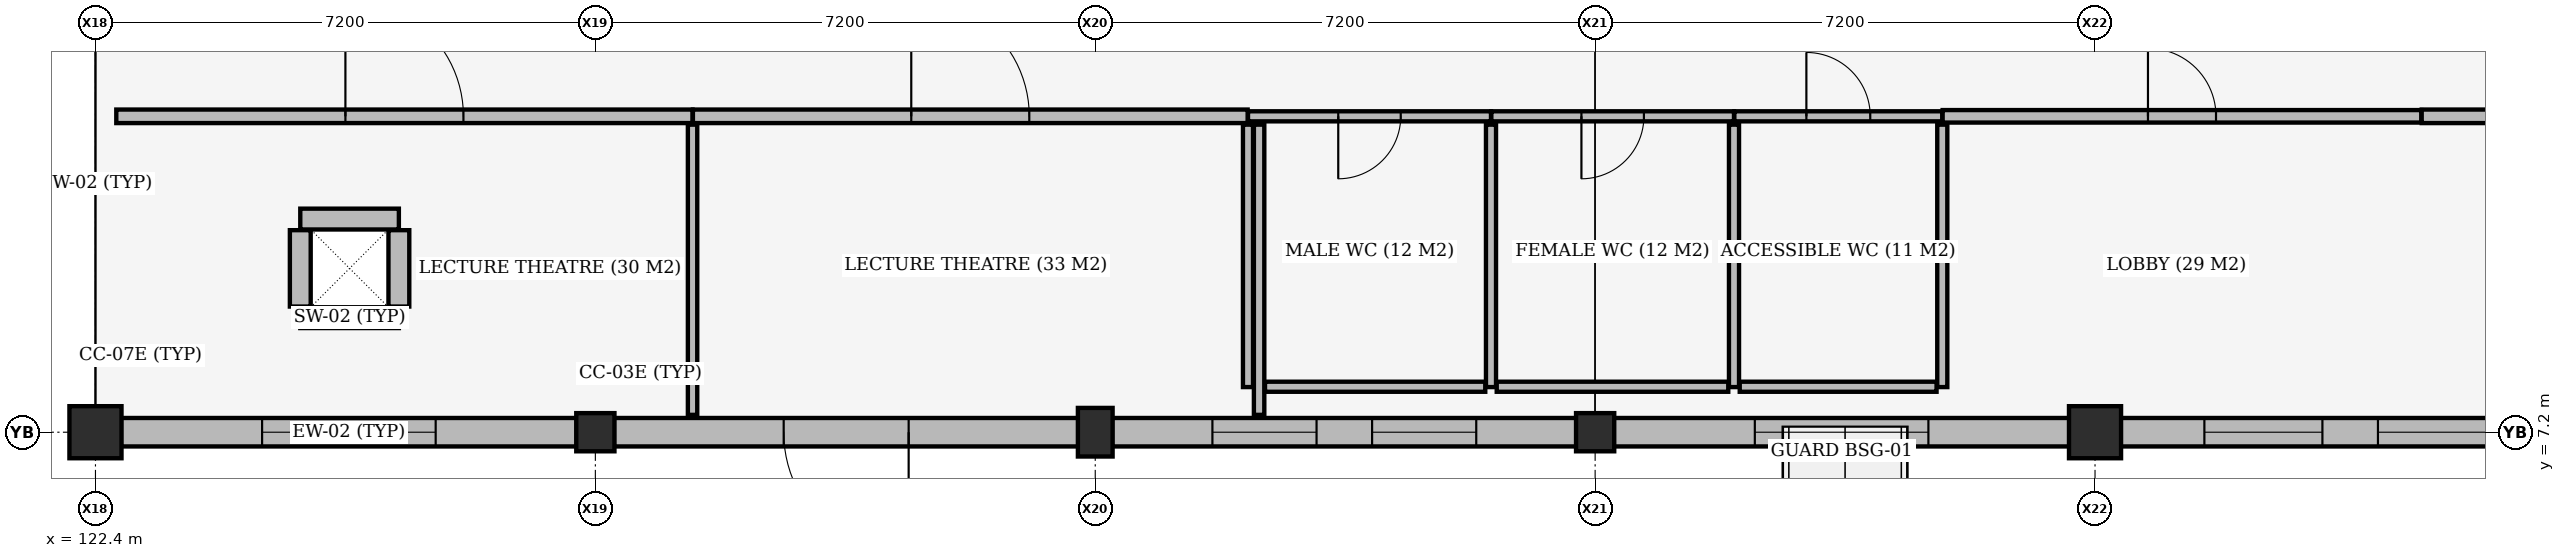
"""IFC4 building model, lengths in metres.
Left out: names, types, materials, properties, quantities, classifications, styles, units other than length and angle.
Written with IfcOpenShell. Run it as: python <this file> out.ifc"""

import sys

from ifc_helpers import new_model, si_unit, direction, frame, frame_2d, origin, origin_2d, place, context, subcontext, project, spatial, rectangle, extrude, element, fill, save


model = new_model("IFC4")
c1 = context("Model", 3, precision=1e-05, world=origin(), true_north=direction((0.0, 1.0)))
c2 = subcontext(c1, "Body", "Model", "MODEL_VIEW")
j1 = project(units=[si_unit("LENGTHUNIT", "METRE"), si_unit("PLANEANGLEUNIT", "RADIAN")], contexts=[c1])
p1 = place(None, origin())
s1 = spatial("IfcSite", under=j1, at=p1, CompositionType="ELEMENT")
p2 = place(p1, origin())
s2 = spatial("IfcBuilding", under=s1, at=p2, CompositionType="ELEMENT")
p3 = place(p2, origin())
s3 = spatial("IfcBuildingStorey", under=s2, at=p3, CompositionType="ELEMENT", Elevation=0.0)
p4 = place(p3, frame((125.35, 8.85, 0.0), z_axis=(0.0, 0.0, 1.0), x_axis=(1.0, 0.0, 0.0)))
e1 = element("IfcWall", 1, at=p4, inside=s3, PredefinedType="SHEAR", context=c2, shape_type="SweptSolid", body=[
    extrude(rectangle(XDim=1.42, YDim=0.3, at=frame_2d((0.71, 0.0))), origin(), (0.0, 0.0, 1.0), 5.16),
])
p5 = place(p3, frame((126.77, 9.01, 0.0), z_axis=(0.0, 0.0, 1.0), x_axis=(0.0, 1.0, 0.0)))
e2 = element("IfcWall", 2, at=p5, inside=s3, PredefinedType="SHEAR", context=c2, shape_type="SweptSolid", body=[
    extrude(rectangle(XDim=1.1, YDim=0.3, at=frame_2d((0.55, 0.0))), origin(), (0.0, 0.0, 1.0), 5.16),
])
p6 = place(p3, frame((126.77, 10.27, 0.0), z_axis=(0.0, 0.0, 1.0), x_axis=(-1.0, 0.0, 0.0)))
e3 = element("IfcWall", 3, at=p6, inside=s3, PredefinedType="SHEAR", context=c2, shape_type="SweptSolid", body=[
    extrude(rectangle(XDim=1.42, YDim=0.3, at=frame_2d((0.71, 0.0))), origin(), (0.0, 0.0, 1.0), 5.16),
])
p7 = place(p3, frame((125.35, 10.11, 0.0), z_axis=(0.0, 0.0, 1.0), x_axis=(0.0, -1.0, 0.0)))
e4 = element("IfcWall", 4, at=p7, inside=s3, PredefinedType="SHEAR", context=c2, shape_type="SweptSolid", body=[
    extrude(rectangle(XDim=1.1, YDim=0.3, at=frame_2d((0.55, 0.0))), origin(), (0.0, 0.0, 1.0), 5.16),
])
p8 = place(p3, frame((122.4, 7.2, 0.0), z_axis=(0.0, 0.0, 1.0), x_axis=(1.0, 0.0, 0.0)))
e5 = element("IfcColumn", 5, at=p8, inside=s3, PredefinedType="COLUMN", context=c2, shape_type="SweptSolid", body=[
    extrude(rectangle(XDim=0.75, YDim=0.75, at=origin_2d()), origin(), (0.0, 0.0, 1.0), 5.1),
])
p9 = place(p3, frame((129.6, 7.2, 0.0), z_axis=(0.0, 0.0, 1.0), x_axis=(1.0, 0.0, 0.0)))
e6 = element("IfcColumn", 6, at=p9, inside=s3, PredefinedType="COLUMN", context=c2, shape_type="SweptSolid", body=[
    extrude(rectangle(XDim=0.55, YDim=0.55, at=origin_2d()), origin(), (0.0, 0.0, 1.0), 5.1),
])
p10 = place(p3, frame((136.8, 7.2, 0.0), z_axis=(0.0, 0.0, 1.0), x_axis=(1.0, 0.0, 0.0)))
e7 = element("IfcColumn", 7, at=p10, inside=s3, PredefinedType="COLUMN", context=c2, shape_type="SweptSolid", body=[
    extrude(rectangle(XDim=0.5, YDim=0.7, at=origin_2d()), origin(), (0.0, 0.0, 1.0), 5.1),
])
p11 = place(p3, frame((144.0, 7.2, 0.0), z_axis=(0.0, 0.0, 1.0), x_axis=(1.0, 0.0, 0.0)))
e8 = element("IfcColumn", 8, at=p11, inside=s3, PredefinedType="COLUMN", context=c2, shape_type="SweptSolid", body=[
    extrude(rectangle(XDim=0.55, YDim=0.55, at=origin_2d()), origin(), (0.0, 0.0, 1.0), 5.1),
])
p12 = place(p3, frame((151.2, 7.2, 0.0), z_axis=(0.0, 0.0, 1.0), x_axis=(1.0, 0.0, 0.0)))
e9 = element("IfcColumn", 9, at=p12, inside=s3, PredefinedType="COLUMN", context=c2, shape_type="SweptSolid", body=[
    extrude(rectangle(XDim=0.75, YDim=0.75, at=origin_2d()), origin(), (0.0, 0.0, 1.0), 5.1),
])
p13 = place(p3, frame((129.333, 7.2, 0.0), z_axis=(0.0, 0.0, 1.0), x_axis=(-1.0, 0.0, 0.0)))
e10 = element("IfcWall", 10, at=p13, inside=s3, PredefinedType="STANDARD", context=c2, shape_type="SweptSolid", body=[
    extrude(rectangle(XDim=6.566, YDim=0.41, at=frame_2d((3.283, 0.0))), origin(), (0.0, 0.0, 1.0), 4.45),
])
p14 = place(p13, frame((2.033, 0.0, 0.85)))
e11 = element("IfcOpeningElement", 11, at=p14, cuts=e10, PredefinedType="OPENING", context=c2, shape_type="SweptSolid", body=[
    extrude(rectangle(XDim=2.5, YDim=2.8, at=frame_2d((1.25, 1.4))), frame((0.0, 0.215, 0.0), z_axis=(0.0, -1.0, 0.0), x_axis=(1.0, 0.0, 0.0)), (0.0, 0.0, 1.0), 0.43),
])
p15 = place(p3, frame((136.558, 7.2, 0.0), z_axis=(0.0, 0.0, 1.0), x_axis=(-1.0, 0.0, 0.0)))
e12 = element("IfcWall", 12, at=p15, inside=s3, PredefinedType="STANDARD", context=c2, shape_type="SweptSolid", body=[
    extrude(rectangle(XDim=6.691, YDim=0.41, at=frame_2d((3.346, 0.0))), origin(), (0.0, 0.0, 1.0), 4.4),
])
p16 = place(p15, frame((2.446, 0.0, 0.0)))
e13 = element("IfcOpeningElement", 13, at=p16, cuts=e12, PredefinedType="OPENING", context=c2, shape_type="SweptSolid", body=[
    extrude(rectangle(XDim=1.8, YDim=2.2, at=frame_2d((0.9, 1.1))), frame((0.0, 0.215, 0.0), z_axis=(0.0, -1.0, 0.0), x_axis=(1.0, 0.0, 0.0)), (0.0, 0.0, 1.0), 0.43),
])
p17 = place(p3, frame((143.733, 7.2, 0.0), z_axis=(0.0, 0.0, 1.0), x_axis=(-1.0, 0.0, 0.0)))
e14 = element("IfcWall", 14, at=p17, inside=s3, PredefinedType="STANDARD", context=c2, shape_type="SweptSolid", body=[
    extrude(rectangle(XDim=6.691, YDim=0.41, at=frame_2d((3.345, 0.0))), origin(), (0.0, 0.0, 1.0), 4.35),
])
p18 = place(p17, frame((1.446, 0.0, 0.95)))
e15 = element("IfcOpeningElement", 15, at=p18, cuts=e14, PredefinedType="OPENING", context=c2, shape_type="SweptSolid", body=[
    extrude(rectangle(XDim=1.5, YDim=2.1, at=frame_2d((0.75, 1.05))), frame((0.0, 0.215, 0.0), z_axis=(0.0, -1.0, 0.0), x_axis=(1.0, 0.0, 0.0)), (0.0, 0.0, 1.0), 0.43),
])
p19 = place(p17, frame((3.746, 0.0, 0.95)))
e16 = element("IfcOpeningElement", 16, at=p19, cuts=e14, PredefinedType="OPENING", context=c2, shape_type="SweptSolid", body=[
    extrude(rectangle(XDim=1.5, YDim=2.1, at=frame_2d((0.75, 1.05))), frame((0.0, 0.215, 0.0), z_axis=(0.0, -1.0, 0.0), x_axis=(1.0, 0.0, 0.0)), (0.0, 0.0, 1.0), 0.43),
])
p20 = place(p3, frame((150.833, 7.2, 0.0), z_axis=(0.0, 0.0, 1.0), x_axis=(-1.0, 0.0, 0.0)))
e17 = element("IfcWall", 17, at=p20, inside=s3, PredefinedType="STANDARD", context=c2, shape_type="SweptSolid", body=[
    extrude(rectangle(XDim=6.566, YDim=0.41, at=frame_2d((3.283, 0.0))), origin(), (0.0, 0.0, 1.0), 4.3),
])
p21 = place(p20, frame((2.033, 0.0, 0.85)))
e18 = element("IfcOpeningElement", 18, at=p21, cuts=e17, PredefinedType="OPENING", context=c2, shape_type="SweptSolid", body=[
    extrude(rectangle(XDim=2.5, YDim=2.8, at=frame_2d((1.25, 1.4))), frame((0.0, 0.215, 0.0), z_axis=(0.0, -1.0, 0.0), x_axis=(1.0, 0.0, 0.0)), (0.0, 0.0, 1.0), 0.43),
])
p22 = place(p3, frame((158.183, 7.2, 0.0), z_axis=(0.0, 0.0, 1.0), x_axis=(-1.0, 0.0, 0.0)))
e19 = element("IfcWall", 19, at=p22, inside=s3, PredefinedType="STANDARD", context=c2, shape_type="SweptSolid", body=[
    extrude(rectangle(XDim=6.616, YDim=0.41, at=frame_2d((3.308, 0.0))), origin(), (0.0, 0.0, 1.0), 4.4),
])
p23 = place(p22, frame((1.208, 0.0, 0.95)))
e20 = element("IfcOpeningElement", 20, at=p23, cuts=e19, PredefinedType="OPENING", context=c2, shape_type="SweptSolid", body=[
    extrude(rectangle(XDim=1.7, YDim=2.1, at=frame_2d((0.85, 1.05))), frame((0.0, 0.215, 0.0), z_axis=(0.0, -1.0, 0.0), x_axis=(1.0, 0.0, 0.0)), (0.0, 0.0, 1.0), 0.43),
])
p24 = place(p22, frame((3.708, 0.0, 0.95)))
e21 = element("IfcOpeningElement", 21, at=p24, cuts=e19, PredefinedType="OPENING", context=c2, shape_type="SweptSolid", body=[
    extrude(rectangle(XDim=1.7, YDim=2.1, at=frame_2d((0.85, 1.05))), frame((0.0, 0.215, 0.0), z_axis=(0.0, -1.0, 0.0), x_axis=(1.0, 0.0, 0.0)), (0.0, 0.0, 1.0), 0.43),
])
p25 = place(p3, frame((139.0, 11.75, 0.0), z_axis=(0.0, 0.0, 1.0), x_axis=(1.0, 0.0, 0.0)))
e22 = element("IfcWall", 22, at=p25, inside=s3, PredefinedType="PLUMBINGWALL", context=c2, shape_type="SweptSolid", body=[
    extrude(rectangle(XDim=3.5, YDim=0.145, at=frame_2d((1.75, 0.0))), origin(), (0.0, 0.0, 1.0), 4.7),
])
p26 = place(p25, frame((1.3, 0.0, 0.0)))
e23 = element("IfcOpeningElement", 23, at=p26, cuts=e22, PredefinedType="OPENING", context=c2, shape_type="SweptSolid", body=[
    extrude(rectangle(XDim=0.9, YDim=2.1, at=frame_2d((0.45, 1.05))), frame((0.0, 0.083, 0.0), z_axis=(0.0, -1.0, 0.0), x_axis=(1.0, 0.0, 0.0)), (0.0, 0.0, 1.0), 0.165),
])
for number, where, z_axis, x_axis in (
    (24, (139.0, 7.85, 0.0), (0.0, 0.0, 1.0), (0.0, 1.0, 0.0)),
    (25, (142.5, 7.85, 0.0), (0.0, 0.0, 1.0), (0.0, 1.0, 0.0)),
):
    element("IfcWall", number, at=place(p3, frame(where, z_axis=z_axis, x_axis=x_axis)), inside=s3, PredefinedType="PLUMBINGWALL", context=c2, shape_type="SweptSolid", body=[
        extrude(rectangle(XDim=3.78, YDim=0.145, at=frame_2d((1.89, 0.0))), origin(), (0.0, 0.0, 1.0), 5.1),
    ])
p27 = place(p3, frame((142.505, 11.75, 0.0), z_axis=(0.0, 0.0, 1.0), x_axis=(1.0, 0.0, 0.0)))
e26 = element("IfcWall", 26, at=p27, inside=s3, PredefinedType="PLUMBINGWALL", context=c2, shape_type="SweptSolid", body=[
    extrude(rectangle(XDim=3.495, YDim=0.145, at=frame_2d((1.748, 0.0))), origin(), (0.0, 0.0, 1.0), 4.35),
])
p28 = place(p27, frame((1.298, 0.0, 0.0)))
e27 = element("IfcOpeningElement", 27, at=p28, cuts=e26, PredefinedType="OPENING", context=c2, shape_type="SweptSolid", body=[
    extrude(rectangle(XDim=0.9, YDim=2.1, at=frame_2d((0.45, 1.05))), frame((0.0, 0.083, 0.0), z_axis=(0.0, -1.0, 0.0), x_axis=(1.0, 0.0, 0.0)), (0.0, 0.0, 1.0), 0.165),
])
p29 = place(p3, frame((146.0, 7.85, 0.0), z_axis=(0.0, 0.0, 1.0), x_axis=(0.0, 1.0, 0.0)))
e28 = element("IfcWall", 28, at=p29, inside=s3, PredefinedType="PLUMBINGWALL", context=c2, shape_type="SweptSolid", body=[
    extrude(rectangle(XDim=3.78, YDim=0.145, at=frame_2d((1.89, 0.0))), origin(), (0.0, 0.0, 1.0), 5.1),
])
p30 = place(p3, frame((146.005, 11.75, 0.0), z_axis=(0.0, 0.0, 1.0), x_axis=(1.0, 0.0, 0.0)))
e29 = element("IfcWall", 29, at=p30, inside=s3, PredefinedType="PLUMBINGWALL", context=c2, shape_type="SweptSolid", body=[
    extrude(rectangle(XDim=2.995, YDim=0.145, at=frame_2d((1.498, 0.0))), origin(), (0.0, 0.0, 1.0), 4.83),
])
p31 = place(p30, frame((1.038, 0.0, 0.0)))
e30 = element("IfcOpeningElement", 30, at=p31, cuts=e29, PredefinedType="OPENING", context=c2, shape_type="SweptSolid", body=[
    extrude(rectangle(XDim=0.92, YDim=2.1, at=frame_2d((0.46, 1.05))), frame((0.0, 0.083, 0.0), z_axis=(0.0, -1.0, 0.0), x_axis=(1.0, 0.0, 0.0)), (0.0, 0.0, 1.0), 0.165),
])
p32 = place(p3, frame((149.0, 7.85, 0.0), z_axis=(0.0, 0.0, 1.0), x_axis=(0.0, 1.0, 0.0)))
e31 = element("IfcWall", 31, at=p32, inside=s3, PredefinedType="PLUMBINGWALL", context=c2, shape_type="SweptSolid", body=[
    extrude(rectangle(XDim=3.78, YDim=0.145, at=frame_2d((1.89, 0.0))), origin(), (0.0, 0.0, 1.0), 5.1),
])
p33 = place(p3, frame((122.7, 11.75, 0.0), z_axis=(0.0, 0.0, 1.0), x_axis=(1.0, 0.0, 0.0)))
e32 = element("IfcWall", 32, at=p33, inside=s3, PredefinedType="PARTITIONING", context=c2, shape_type="SweptSolid", body=[
    extrude(rectangle(XDim=8.3, YDim=0.195, at=frame_2d((4.15, 0.0))), origin(), (0.0, 0.0, 1.0), 4.4),
])
p34 = place(p33, frame((3.3, 0.0, 0.0)))
e33 = element("IfcOpeningElement", 33, at=p34, cuts=e32, PredefinedType="OPENING", context=c2, shape_type="SweptSolid", body=[
    extrude(rectangle(XDim=1.7, YDim=2.25, at=frame_2d((0.85, 1.125))), frame((0.0, 0.107, 0.0), z_axis=(0.0, -1.0, 0.0), x_axis=(1.0, 0.0, 0.0)), (0.0, 0.0, 1.0), 0.215),
])
p35 = place(p3, frame((131.0, 7.45, 0.0), z_axis=(0.0, 0.0, 1.0), x_axis=(0.0, 1.0, 0.0)))
e34 = element("IfcWall", 34, at=p35, inside=s3, PredefinedType="PARTITIONING", context=c2, shape_type="SweptSolid", body=[
    extrude(rectangle(XDim=4.18, YDim=0.135, at=frame_2d((2.09, 0.0))), origin(), (0.0, 0.0, 1.0), 5.1),
])
p36 = place(p3, frame((131.005, 11.75, 0.0), z_axis=(0.0, 0.0, 1.0), x_axis=(1.0, 0.0, 0.0)))
e35 = element("IfcWall", 35, at=p36, inside=s3, PredefinedType="PARTITIONING", context=c2, shape_type="SweptSolid", body=[
    extrude(rectangle(XDim=7.99, YDim=0.195, at=frame_2d((3.995, 0.0))), origin(), (0.0, 0.0, 1.0), 4.45),
])
p37 = place(p36, frame((3.145, 0.0, 0.0)))
e36 = element("IfcOpeningElement", 36, at=p37, cuts=e35, PredefinedType="OPENING", context=c2, shape_type="SweptSolid", body=[
    extrude(rectangle(XDim=1.7, YDim=2.25, at=frame_2d((0.85, 1.125))), frame((0.0, 0.107, 0.0), z_axis=(0.0, -1.0, 0.0), x_axis=(1.0, 0.0, 0.0)), (0.0, 0.0, 1.0), 0.215),
])
p38 = place(p3, frame((139.16, 7.45, 0.0), z_axis=(0.0, 0.0, 1.0), x_axis=(0.0, 1.0, 0.0)))
e37 = element("IfcWall", 37, at=p38, inside=s3, PredefinedType="PARTITIONING", context=c2, shape_type="SweptSolid", body=[
    extrude(rectangle(XDim=4.18, YDim=0.15, at=frame_2d((2.09, 0.0))), origin(), (0.0, 0.0, 1.0), 4.74),
])
p39 = place(p3, frame((149.005, 11.75, 0.0), z_axis=(0.0, 0.0, 1.0), x_axis=(1.0, 0.0, 0.0)))
e38 = element("IfcWall", 38, at=p39, inside=s3, PredefinedType="PARTITIONING", context=c2, shape_type="SweptSolid", body=[
    extrude(rectangle(XDim=6.895, YDim=0.18, at=frame_2d((3.448, 0.0))), origin(), (0.0, 0.0, 1.0), 4.5),
])
p40 = place(p39, frame((2.958, 0.0, 0.0)))
e39 = element("IfcOpeningElement", 39, at=p40, cuts=e38, PredefinedType="OPENING", context=c2, shape_type="SweptSolid", body=[
    extrude(rectangle(XDim=0.98, YDim=2.18, at=frame_2d((0.49, 1.09))), frame((0.0, 0.1, 0.0), z_axis=(0.0, -1.0, 0.0), x_axis=(1.0, 0.0, 0.0)), (0.0, 0.0, 1.0), 0.2),
])
p41 = place(p3, frame((155.905, 11.75, 0.0), z_axis=(0.0, 0.0, 1.0), x_axis=(1.0, 0.0, 0.0)))
e40 = element("IfcWall", 40, at=p41, inside=s3, PredefinedType="PARTITIONING", context=c2, shape_type="SweptSolid", body=[
    extrude(rectangle(XDim=9.792, YDim=0.195, at=frame_2d((4.896, 0.0))), origin(), (0.0, 0.0, 1.0), 4.35),
])
p42 = place(p41, frame((4.046, 0.0, 0.0)))
e41 = element("IfcOpeningElement", 41, at=p42, cuts=e40, PredefinedType="OPENING", context=c2, shape_type="SweptSolid", body=[
    extrude(rectangle(XDim=1.7, YDim=2.25, at=frame_2d((0.85, 1.125))), frame((0.0, 0.107, 0.0), z_axis=(0.0, -1.0, 0.0), x_axis=(1.0, 0.0, 0.0)), (0.0, 0.0, 1.0), 0.215),
])
p43 = place(p3, frame((139.245, 7.855, 0.0), z_axis=(0.0, 0.0, 1.0), x_axis=(1.0, 0.0, 0.0)))
e42 = element("IfcWall", 42, at=p43, inside=s3, PredefinedType="PLUMBINGWALL", context=c2, shape_type="SweptSolid", body=[
    extrude(rectangle(XDim=3.172, YDim=0.145, at=frame_2d((1.586, 0.0))), origin(), (0.0, 0.0, 1.0), 4.7),
])
p44 = place(p3, frame((142.583, 7.855, 0.0), z_axis=(0.0, 0.0, 1.0), x_axis=(1.0, 0.0, 0.0)))
e43 = element("IfcWall", 43, at=p44, inside=s3, PredefinedType="PLUMBINGWALL", context=c2, shape_type="SweptSolid", body=[
    extrude(rectangle(XDim=3.335, YDim=0.145, at=frame_2d((1.667, 0.0))), origin(), (0.0, 0.0, 1.0), 4.35),
])
p45 = place(p3, frame((146.083, 7.855, 0.0), z_axis=(0.0, 0.0, 1.0), x_axis=(1.0, 0.0, 0.0)))
e44 = element("IfcWall", 44, at=p45, inside=s3, PredefinedType="PLUMBINGWALL", context=c2, shape_type="SweptSolid", body=[
    extrude(rectangle(XDim=2.835, YDim=0.145, at=frame_2d((1.417, 0.0))), origin(), (0.0, 0.0, 1.0), 4.83),
])
p46 = place(p14, origin())
e45 = element("IfcWindow", 45, at=p46, inside=s3, PartitioningType="DOUBLE_PANEL_VERTICAL", PredefinedType="WINDOW", context=c2, shape_type="SweptSolid", body=[
    extrude(rectangle(XDim=2.5, YDim=2.8, at=frame_2d((1.25, 1.4))), frame((0.0, 0.03, 0.0), z_axis=(0.0, -1.0, 0.0), x_axis=(1.0, 0.0, 0.0)), (0.0, 0.0, 1.0), 0.06),
])
fill(e11, e45)
p47 = place(p16, origin())
e46 = element("IfcDoor", 46, at=p47, inside=s3, OperationType="DOUBLE_DOOR_SINGLE_SWING", PredefinedType="DOOR", context=c2, shape_type="SweptSolid", body=[
    extrude(rectangle(XDim=1.8, YDim=2.2, at=frame_2d((0.9, 1.1))), frame((0.0, 0.025, 0.0), z_axis=(0.0, -1.0, 0.0), x_axis=(1.0, 0.0, 0.0)), (0.0, 0.0, 1.0), 0.05),
])
fill(e13, e46)
p48 = place(p18, origin())
e47 = element("IfcWindow", 47, at=p48, inside=s3, PartitioningType="DOUBLE_PANEL_VERTICAL", PredefinedType="WINDOW", context=c2, shape_type="SweptSolid", body=[
    extrude(rectangle(XDim=1.5, YDim=2.1, at=frame_2d((0.75, 1.05))), frame((0.0, 0.03, 0.0), z_axis=(0.0, -1.0, 0.0), x_axis=(1.0, 0.0, 0.0)), (0.0, 0.0, 1.0), 0.06),
])
fill(e15, e47)
p49 = place(p19, origin())
e48 = element("IfcWindow", 48, at=p49, inside=s3, PartitioningType="DOUBLE_PANEL_VERTICAL", PredefinedType="WINDOW", context=c2, shape_type="SweptSolid", body=[
    extrude(rectangle(XDim=1.5, YDim=2.1, at=frame_2d((0.75, 1.05))), frame((0.0, 0.03, 0.0), z_axis=(0.0, -1.0, 0.0), x_axis=(1.0, 0.0, 0.0)), (0.0, 0.0, 1.0), 0.06),
])
fill(e16, e48)
p50 = place(p21, origin())
e49 = element("IfcWindow", 49, at=p50, inside=s3, PartitioningType="DOUBLE_PANEL_VERTICAL", PredefinedType="WINDOW", context=c2, shape_type="SweptSolid", body=[
    extrude(rectangle(XDim=2.5, YDim=2.8, at=frame_2d((1.25, 1.4))), frame((0.0, 0.03, 0.0), z_axis=(0.0, -1.0, 0.0), x_axis=(1.0, 0.0, 0.0)), (0.0, 0.0, 1.0), 0.06),
])
fill(e18, e49)
p51 = place(p23, origin())
e50 = element("IfcWindow", 50, at=p51, inside=s3, PartitioningType="DOUBLE_PANEL_VERTICAL", PredefinedType="WINDOW", context=c2, shape_type="SweptSolid", body=[
    extrude(rectangle(XDim=1.7, YDim=2.1, at=frame_2d((0.85, 1.05))), frame((0.0, 0.03, 0.0), z_axis=(0.0, -1.0, 0.0), x_axis=(1.0, 0.0, 0.0)), (0.0, 0.0, 1.0), 0.06),
])
fill(e20, e50)
p52 = place(p24, origin())
e51 = element("IfcWindow", 51, at=p52, inside=s3, PartitioningType="DOUBLE_PANEL_VERTICAL", PredefinedType="WINDOW", context=c2, shape_type="SweptSolid", body=[
    extrude(rectangle(XDim=1.7, YDim=2.1, at=frame_2d((0.85, 1.05))), frame((0.0, 0.03, 0.0), z_axis=(0.0, -1.0, 0.0), x_axis=(1.0, 0.0, 0.0)), (0.0, 0.0, 1.0), 0.06),
])
fill(e21, e51)
p53 = place(p26, origin())
e52 = element("IfcDoor", 52, at=p53, inside=s3, OperationType="SINGLE_SWING_RIGHT", PredefinedType="DOOR", context=c2, shape_type="SweptSolid", body=[
    extrude(rectangle(XDim=0.9, YDim=2.1, at=frame_2d((0.45, 1.05))), frame((0.0, 0.025, 0.0), z_axis=(0.0, -1.0, 0.0), x_axis=(1.0, 0.0, 0.0)), (0.0, 0.0, 1.0), 0.05),
])
fill(e23, e52)
p54 = place(p28, origin())
e53 = element("IfcDoor", 53, at=p54, inside=s3, OperationType="SINGLE_SWING_RIGHT", PredefinedType="DOOR", context=c2, shape_type="SweptSolid", body=[
    extrude(rectangle(XDim=0.9, YDim=2.1, at=frame_2d((0.45, 1.05))), frame((0.0, 0.025, 0.0), z_axis=(0.0, -1.0, 0.0), x_axis=(1.0, 0.0, 0.0)), (0.0, 0.0, 1.0), 0.05),
])
fill(e27, e53)
p55 = place(p31, origin())
e54 = element("IfcDoor", 54, at=p55, inside=s3, OperationType="SINGLE_SWING_LEFT", PredefinedType="DOOR", context=c2, shape_type="SweptSolid", body=[
    extrude(rectangle(XDim=0.92, YDim=2.1, at=frame_2d((0.46, 1.05))), frame((0.0, 0.025, 0.0), z_axis=(0.0, -1.0, 0.0), x_axis=(1.0, 0.0, 0.0)), (0.0, 0.0, 1.0), 0.05),
])
fill(e30, e54)
p56 = place(p34, origin())
e55 = element("IfcDoor", 55, at=p56, inside=s3, OperationType="DOUBLE_DOOR_SINGLE_SWING", PredefinedType="DOOR", context=c2, shape_type="SweptSolid", body=[
    extrude(rectangle(XDim=1.7, YDim=2.25, at=frame_2d((0.85, 1.125))), frame((0.0, 0.025, 0.0), z_axis=(0.0, -1.0, 0.0), x_axis=(1.0, 0.0, 0.0)), (0.0, 0.0, 1.0), 0.05),
])
fill(e33, e55)
p57 = place(p37, origin())
e56 = element("IfcDoor", 56, at=p57, inside=s3, OperationType="DOUBLE_DOOR_SINGLE_SWING", PredefinedType="DOOR", context=c2, shape_type="SweptSolid", body=[
    extrude(rectangle(XDim=1.7, YDim=2.25, at=frame_2d((0.85, 1.125))), frame((0.0, 0.025, 0.0), z_axis=(0.0, -1.0, 0.0), x_axis=(1.0, 0.0, 0.0)), (0.0, 0.0, 1.0), 0.05),
])
fill(e36, e56)
p58 = place(p40, origin())
e57 = element("IfcDoor", 57, at=p58, inside=s3, OperationType="SINGLE_SWING_LEFT", PredefinedType="DOOR", context=c2, shape_type="SweptSolid", body=[
    extrude(rectangle(XDim=0.98, YDim=2.18, at=frame_2d((0.49, 1.09))), frame((0.0, 0.025, 0.0), z_axis=(0.0, -1.0, 0.0), x_axis=(1.0, 0.0, 0.0)), (0.0, 0.0, 1.0), 0.05),
])
fill(e39, e57)
save(model, sys.argv[1])
